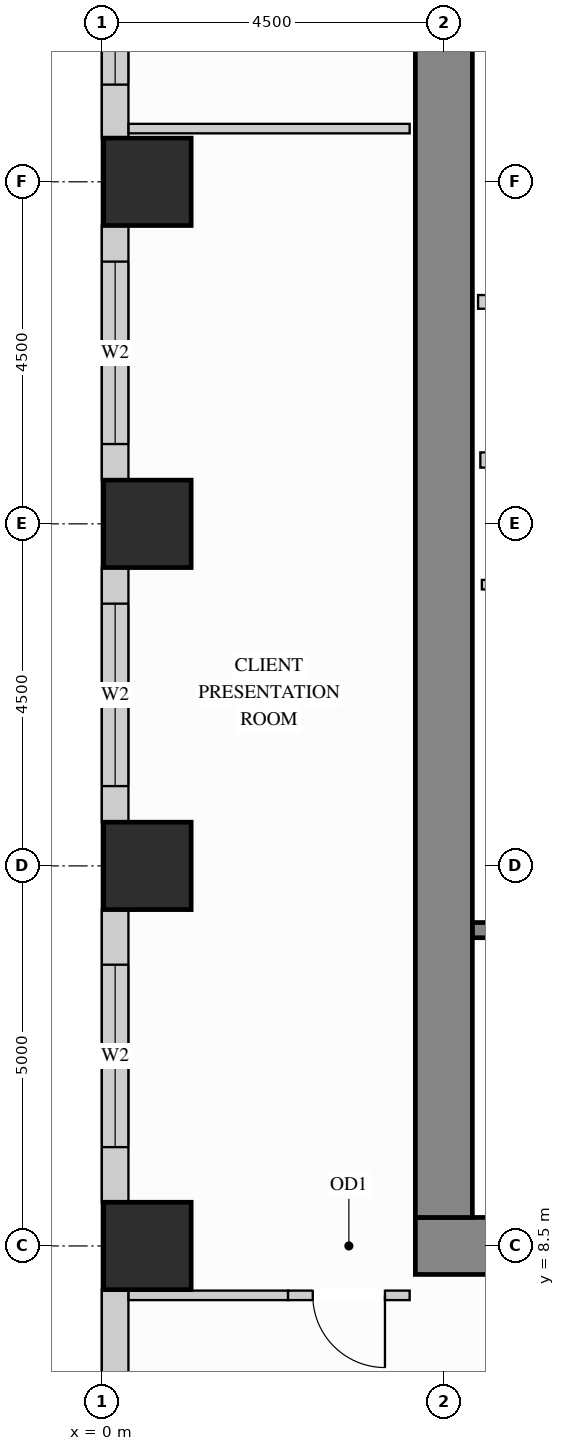
"""IFC4 building model, lengths in metres.
Left out: names, types, materials, properties, quantities, classifications, styles, units other than length and angle.
Written with IfcOpenShell. Run it as: python <this file> out.ifc"""

import sys

from ifc_helpers import new_model, si_unit, direction, frame, frame_2d, origin, origin_2d, place, context, subcontext, project, spatial, rectangle, extrude, source, transform, mapped, element, fill, save


model = new_model("IFC4")
c1 = context("Model", 3, precision=1e-05, world=origin(), true_north=direction((0.0, 1.0)))
c2 = subcontext(c1, "Body", "Model", "MODEL_VIEW")
j1 = project(units=[si_unit("LENGTHUNIT", "METRE"), si_unit("PLANEANGLEUNIT", "RADIAN")], contexts=[c1])
p1 = place(None, origin())
s1 = spatial("IfcSite", under=j1, at=p1, CompositionType="ELEMENT")
p2 = place(p1, origin())
s2 = spatial("IfcBuilding", under=s1, at=p2, CompositionType="ELEMENT")
p3 = place(p2, frame((0.0, 0.0, 84.6)))
s3 = spatial("IfcBuildingStorey", under=s2, at=p3, CompositionType="ELEMENT", Elevation=84.6)
m1 = source(origin(), c2, "Body", "SweptSolid", [
    extrude(rectangle(XDim=1.15, YDim=1.15, at=origin_2d()), origin(), (0.0, 0.0, 1.0), 3.38),
])
for number, where, z_axis, x_axis in (
    (1, (0.6, 13.5, 0.0), (0.0, 0.0, 1.0), (1.0, 0.0, 0.0)),
    (2, (0.6, 18.0, 0.0), (0.0, 0.0, 1.0), (1.0, 0.0, 0.0)),
    (3, (0.6, 22.5, 0.0), (0.0, 0.0, 1.0), (1.0, 0.0, 0.0)),
    (4, (0.6, 8.5, 0.0), (0.0, 0.0, 1.0), (1.0, 0.0, 0.0)),
):
    element("IfcColumn", number, at=place(p3, frame(where, z_axis=z_axis, x_axis=x_axis)), inside=s3, PredefinedType="COLUMN", context=c2, shape_type="MappedRepresentation", body=[
        mapped(m1, transform((0.0, 0.0, 0.0), x_axis=(1.0, 0.0, 0.0), y_axis=(0.0, 1.0, 0.0), z_axis=(0.0, 0.0, 1.0))),
    ])
m2 = source(origin(), c2, "Body", "SweptSolid", [
    extrude(rectangle(XDim=10.75, YDim=0.75, at=frame_2d((5.375, 0.0))), origin(), (0.0, 0.0, 1.0), 3.38),
])
p4 = place(p3, frame((4.125, 8.5, 0.0), z_axis=(0.0, 0.0, 1.0), x_axis=(1.0, 0.0, 0.0)))
e5 = element("IfcWall", 5, at=p4, inside=s3, PredefinedType="SHEAR", context=c2, shape_type="MappedRepresentation", body=[
    mapped(m2, transform((0.0, 0.0, 0.0), x_axis=(1.0, 0.0, 0.0), y_axis=(0.0, 1.0, 0.0), z_axis=(0.0, 0.0, 1.0))),
])
m3 = source(origin(), c2, "Body", "SweptSolid", [
    extrude(rectangle(XDim=20.25, YDim=0.75, at=frame_2d((10.125, 0.0))), origin(), (0.0, 0.0, 1.0), 3.38),
])
p5 = place(p3, frame((4.5, 8.875, 0.0), z_axis=(0.0, 0.0, 1.0), x_axis=(0.0, 1.0, 0.0)))
e6 = element("IfcWall", 6, at=p5, inside=s3, PredefinedType="SHEAR", context=c2, shape_type="MappedRepresentation", body=[
    mapped(m3, transform((0.0, 0.0, 0.0), x_axis=(1.0, 0.0, 0.0), y_axis=(0.0, 1.0, 0.0), z_axis=(0.0, 0.0, 1.0))),
])
p6 = place(p3, frame((0.175, 26.227, 0.0), z_axis=(0.0, 0.0, 1.0), x_axis=(0.0, -1.0, 0.0)))
e7 = element("IfcWall", 7, at=p6, inside=s3, PredefinedType="SOLIDWALL", context=c2, shape_type="SweptSolid", body=[
    extrude(rectangle(XDim=3.154, YDim=0.35, at=frame_2d((1.577, 0.0))), origin(), (0.0, 0.0, 1.0), 3.365),
])
p7 = place(p6, frame((0.648, 0.0, 0.78)))
e8 = element("IfcOpeningElement", 8, at=p7, cuts=e7, PredefinedType="OPENING", context=c2, shape_type="SweptSolid", body=[
    extrude(rectangle(XDim=1.8, YDim=2.1, at=frame_2d((0.9, 1.05))), frame((0.0, 0.185, 0.0), z_axis=(0.0, -1.0, 0.0), x_axis=(1.0, 0.0, 0.0)), (0.0, 0.0, 1.0), 0.37),
])
p8 = place(p3, frame((0.175, 21.927, 0.0), z_axis=(0.0, 0.0, 1.0), x_axis=(0.0, -1.0, 0.0)))
e9 = element("IfcWall", 9, at=p8, inside=s3, PredefinedType="SOLIDWALL", context=c2, shape_type="SweptSolid", body=[
    extrude(rectangle(XDim=3.354, YDim=0.35, at=frame_2d((1.677, 0.0))), origin(), (0.0, 0.0, 1.0), 3.365),
])
p9 = place(p8, frame((0.477, 0.0, 0.78)))
e10 = element("IfcOpeningElement", 10, at=p9, cuts=e9, PredefinedType="OPENING", context=c2, shape_type="SweptSolid", body=[
    extrude(rectangle(XDim=2.4, YDim=2.1, at=frame_2d((1.2, 1.05))), frame((0.0, 0.185, 0.0), z_axis=(0.0, -1.0, 0.0), x_axis=(1.0, 0.0, 0.0)), (0.0, 0.0, 1.0), 0.37),
])
p10 = place(p3, frame((0.175, 17.427, 0.0), z_axis=(0.0, 0.0, 1.0), x_axis=(0.0, -1.0, 0.0)))
e11 = element("IfcWall", 11, at=p10, inside=s3, PredefinedType="SOLIDWALL", context=c2, shape_type="SweptSolid", body=[
    extrude(rectangle(XDim=3.354, YDim=0.35, at=frame_2d((1.677, 0.0))), origin(), (0.0, 0.0, 1.0), 3.365),
])
p11 = place(p10, frame((0.477, 0.0, 0.78)))
e12 = element("IfcOpeningElement", 12, at=p11, cuts=e11, PredefinedType="OPENING", context=c2, shape_type="SweptSolid", body=[
    extrude(rectangle(XDim=2.4, YDim=2.1, at=frame_2d((1.2, 1.05))), frame((0.0, 0.185, 0.0), z_axis=(0.0, -1.0, 0.0), x_axis=(1.0, 0.0, 0.0)), (0.0, 0.0, 1.0), 0.37),
])
p12 = place(p3, frame((0.175, 12.927, 0.0), z_axis=(0.0, 0.0, 1.0), x_axis=(0.0, -1.0, 0.0)))
e13 = element("IfcWall", 13, at=p12, inside=s3, PredefinedType="SOLIDWALL", context=c2, shape_type="SweptSolid", body=[
    extrude(rectangle(XDim=3.854, YDim=0.35, at=frame_2d((1.927, 0.0))), origin(), (0.0, 0.0, 1.0), 3.365),
])
p13 = place(p12, frame((0.727, 0.0, 0.78)))
e14 = element("IfcOpeningElement", 14, at=p13, cuts=e13, PredefinedType="OPENING", context=c2, shape_type="SweptSolid", body=[
    extrude(rectangle(XDim=2.4, YDim=2.1, at=frame_2d((1.2, 1.05))), frame((0.0, 0.185, 0.0), z_axis=(0.0, -1.0, 0.0), x_axis=(1.0, 0.0, 0.0)), (0.0, 0.0, 1.0), 0.37),
])
p14 = place(p3, frame((0.175, 7.927, 0.0), z_axis=(0.0, 0.0, 1.0), x_axis=(0.0, -1.0, 0.0)))
e15 = element("IfcWall", 15, at=p14, inside=s3, PredefinedType="SOLIDWALL", context=c2, shape_type="SweptSolid", body=[
    extrude(rectangle(XDim=3.854, YDim=0.35, at=frame_2d((1.927, 0.0))), origin(), (0.0, 0.0, 1.0), 3.365),
])
p15 = place(p14, frame((2.156, 0.0, 0.78)))
e16 = element("IfcOpeningElement", 16, at=p15, cuts=e15, PredefinedType="OPENING", context=c2, shape_type="SweptSolid", body=[
    extrude(rectangle(XDim=1.2, YDim=2.1, at=frame_2d((0.6, 1.05))), frame((0.0, 0.185, 0.0), z_axis=(0.0, -1.0, 0.0), x_axis=(1.0, 0.0, 0.0)), (0.0, 0.0, 1.0), 0.37),
])
m4 = source(origin(), c2, "Body", "SweptSolid", [
    extrude(rectangle(XDim=2.2, YDim=0.18, at=frame_2d((1.1, 0.0))), origin(), (0.0, 0.0, 1.0), 3.365),
])
p16 = place(p3, frame((4.95, 20.92, 0.0), z_axis=(0.0, 0.0, 1.0), x_axis=(1.0, 0.0, 0.0)))
e17 = element("IfcWall", 17, at=p16, inside=s3, PredefinedType="PARTITIONING", context=c2, shape_type="MappedRepresentation", body=[
    mapped(m4, transform((0.0, 0.0, 0.0), x_axis=(1.0, 0.0, 0.0), y_axis=(0.0, 1.0, 0.0), z_axis=(0.0, 0.0, 1.0))),
])
p17 = place(p3, frame((5.0, 17.2, 0.0), z_axis=(0.0, 0.0, 1.0), x_axis=(1.0, 0.0, 0.0)))
e18 = element("IfcWall", 18, at=p17, inside=s3, PredefinedType="PARTITIONING", context=c2, shape_type="SweptSolid", body=[
    extrude(rectangle(XDim=2.4, YDim=0.125, at=frame_2d((1.2, 0.0))), origin(), (0.0, 0.0, 1.0), 3.365),
])
p18 = place(p17, frame((0.7, 0.0, 0.0)))
e19 = element("IfcOpeningElement", 19, at=p18, cuts=e18, PredefinedType="OPENING", context=c2, shape_type="SweptSolid", body=[
    extrude(rectangle(XDim=0.85, YDim=2.1, at=frame_2d((0.425, 1.05))), frame((0.0, 0.073, 0.0), z_axis=(0.0, -1.0, 0.0), x_axis=(1.0, 0.0, 0.0)), (0.0, 0.0, 1.0), 0.145),
])
m5 = source(origin(), c2, "Body", "SweptSolid", [
    extrude(rectangle(XDim=2.098, YDim=0.125, at=frame_2d((1.049, 0.0))), origin(), (0.0, 0.0, 1.0), 3.365),
])
p19 = place(p3, frame((0.352, 7.85, 0.0), z_axis=(0.0, 0.0, 1.0), x_axis=(1.0, 0.0, 0.0)))
e20 = element("IfcWall", 20, at=p19, inside=s3, PredefinedType="PARTITIONING", context=c2, shape_type="MappedRepresentation", body=[
    mapped(m5, transform((0.0, 0.0, 0.0), x_axis=(1.0, 0.0, 0.0), y_axis=(0.0, 1.0, 0.0), z_axis=(0.0, 0.0, 1.0))),
])
p20 = place(p3, frame((2.45, 7.85, 0.0), z_axis=(0.0, 0.0, 1.0), x_axis=(1.0, 0.0, 0.0)))
e21 = element("IfcWall", 21, at=p20, inside=s3, PredefinedType="PARTITIONING", context=c2, shape_type="SweptSolid", body=[
    extrude(rectangle(XDim=1.6, YDim=0.125, at=frame_2d((0.8, 0.0))), origin(), (0.0, 0.0, 1.0), 3.365),
])
p21 = place(p20, frame((0.325, 0.0, 0.0)))
e22 = element("IfcOpeningElement", 22, at=p21, cuts=e21, PredefinedType="OPENING", context=c2, shape_type="SweptSolid", body=[
    extrude(rectangle(XDim=0.95, YDim=2.15, at=frame_2d((0.475, 1.075))), frame((0.0, 0.073, 0.0), z_axis=(0.0, -1.0, 0.0), x_axis=(1.0, 0.0, 0.0)), (0.0, 0.0, 1.0), 0.145),
])
m6 = source(origin(), c2, "Body", "SweptSolid", [
    extrude(rectangle(XDim=3.698, YDim=0.125, at=frame_2d((1.849, 0.0))), origin(), (0.0, 0.0, 1.0), 3.365),
])
p22 = place(p3, frame((0.352, 23.2, 0.0), z_axis=(0.0, 0.0, 1.0), x_axis=(1.0, 0.0, 0.0)))
e23 = element("IfcWall", 23, at=p22, inside=s3, PredefinedType="PARTITIONING", context=c2, shape_type="MappedRepresentation", body=[
    mapped(m6, transform((0.0, 0.0, 0.0), x_axis=(1.0, 0.0, 0.0), y_axis=(0.0, 1.0, 0.0), z_axis=(0.0, 0.0, 1.0))),
])
m7 = source(origin(), c2, "Body", "SweptSolid", [
    extrude(rectangle(XDim=2.09, YDim=0.2, at=frame_2d((1.045, 0.0))), origin(), (0.0, 0.0, 1.0), 3.365),
])
p23 = place(p3, frame((4.98, 18.84, 0.0), z_axis=(0.0, 0.0, 1.0), x_axis=(1.0, 0.0, 0.0)))
e24 = element("IfcWall", 24, at=p23, inside=s3, PredefinedType="PARTITIONING", context=c2, shape_type="MappedRepresentation", body=[
    mapped(m7, transform((0.0, 0.0, 0.0), x_axis=(1.0, 0.0, 0.0), y_axis=(0.0, 1.0, 0.0), z_axis=(0.0, 0.0, 1.0))),
])
p24 = place(p3, frame((4.877, 12.655, 0.0), z_axis=(0.0, 0.0, 1.0), x_axis=(1.0, 0.0, 0.0)))
e25 = element("IfcWall", 25, at=p24, inside=s3, PredefinedType="SHEAR", context=c2, shape_type="SweptSolid", body=[
    extrude(rectangle(XDim=7.528, YDim=0.2, at=frame_2d((3.764, 0.0))), origin(), (0.0, 0.0, 1.0), 3.38),
])
p25 = place(p24, frame((0.4, 0.0, 0.0)))
e26 = element("IfcOpeningElement", 26, at=p25, cuts=e25, PredefinedType="OPENING", context=c2, shape_type="SweptSolid", body=[
    extrude(rectangle(XDim=1.1, YDim=2.15, at=frame_2d((0.55, 1.075))), frame((0.0, 0.11, 0.0), z_axis=(0.0, -1.0, 0.0), x_axis=(1.0, 0.0, 0.0)), (0.0, 0.0, 1.0), 0.22),
])
m8 = source(origin(), c2, "Body", "SweptSolid", [
    extrude(rectangle(XDim=0.95, YDim=2.15, at=frame_2d((0.475, 1.075))), frame((0.0, 0.025, 0.0), z_axis=(0.0, -1.0, 0.0), x_axis=(1.0, 0.0, 0.0)), (0.0, 0.0, 1.0), 0.05),
])
p26 = place(p21, origin())
e27 = element("IfcDoor", 27, at=p26, inside=s3, OperationType="SINGLE_SWING_RIGHT", PredefinedType="DOOR", context=c2, shape_type="MappedRepresentation", body=[
    mapped(m8, transform((0.0, 0.0, 0.0), x_axis=(1.0, 0.0, 0.0), y_axis=(0.0, 1.0, 0.0), z_axis=(0.0, 0.0, 1.0))),
])
fill(e22, e27)
m9 = source(origin(), c2, "Body", "SweptSolid", [
    extrude(rectangle(XDim=1.8, YDim=2.1, at=frame_2d((0.9, 1.05))), frame((0.0, 0.03, 0.0), z_axis=(0.0, -1.0, 0.0), x_axis=(1.0, 0.0, 0.0)), (0.0, 0.0, 1.0), 0.06),
])
p27 = place(p7, origin())
e28 = element("IfcWindow", 28, at=p27, inside=s3, PartitioningType="SINGLE_PANEL", PredefinedType="WINDOW", context=c2, shape_type="MappedRepresentation", body=[
    mapped(m9, transform((0.0, 0.0, 0.0), x_axis=(1.0, 0.0, 0.0), y_axis=(0.0, 1.0, 0.0), z_axis=(0.0, 0.0, 1.0))),
])
fill(e8, e28)
m10 = source(origin(), c2, "Body", "SweptSolid", [
    extrude(rectangle(XDim=2.4, YDim=2.1, at=frame_2d((1.2, 1.05))), frame((0.0, 0.03, 0.0), z_axis=(0.0, -1.0, 0.0), x_axis=(1.0, 0.0, 0.0)), (0.0, 0.0, 1.0), 0.06),
])
p28 = place(p9, origin())
e29 = element("IfcWindow", 29, at=p28, inside=s3, PartitioningType="SINGLE_PANEL", PredefinedType="WINDOW", context=c2, shape_type="MappedRepresentation", body=[
    mapped(m10, transform((0.0, 0.0, 0.0), x_axis=(1.0, 0.0, 0.0), y_axis=(0.0, 1.0, 0.0), z_axis=(0.0, 0.0, 1.0))),
])
fill(e10, e29)
p29 = place(p11, origin())
e30 = element("IfcWindow", 30, at=p29, inside=s3, PartitioningType="SINGLE_PANEL", PredefinedType="WINDOW", context=c2, shape_type="MappedRepresentation", body=[
    mapped(m10, transform((0.0, 0.0, 0.0), x_axis=(1.0, 0.0, 0.0), y_axis=(0.0, 1.0, 0.0), z_axis=(0.0, 0.0, 1.0))),
])
fill(e12, e30)
p30 = place(p13, origin())
e31 = element("IfcWindow", 31, at=p30, inside=s3, PartitioningType="SINGLE_PANEL", PredefinedType="WINDOW", context=c2, shape_type="MappedRepresentation", body=[
    mapped(m10, transform((0.0, 0.0, 0.0), x_axis=(1.0, 0.0, 0.0), y_axis=(0.0, 1.0, 0.0), z_axis=(0.0, 0.0, 1.0))),
])
fill(e14, e31)
save(model, sys.argv[1])
